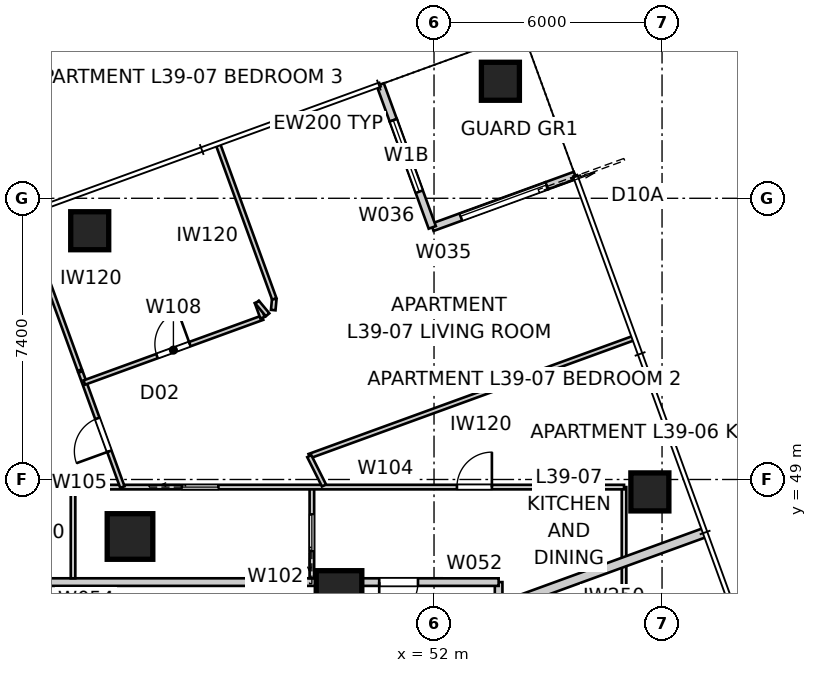
"""IFC4 building model, lengths in metres.
Left out: names, types, materials, properties, quantities, classifications, styles, units other than length and angle.
Written with IfcOpenShell. Run it as: python <this file> out.ifc"""

import sys

from ifc_helpers import new_model, si_unit, direction, frame, frame_2d, origin, origin_2d, place, context, subcontext, project, spatial, rectangle, extrude, element, fill, save


model = new_model("IFC4")
c1 = context("Model", 3, precision=1e-05, world=origin(), true_north=direction((0.0, 1.0)))
c2 = subcontext(c1, "Body", "Model", "MODEL_VIEW")
j1 = project(units=[si_unit("LENGTHUNIT", "METRE"), si_unit("PLANEANGLEUNIT", "RADIAN")], contexts=[c1])
p1 = place(None, origin())
s1 = spatial("IfcSite", under=j1, at=p1, CompositionType="ELEMENT")
p2 = place(p1, origin())
s2 = spatial("IfcBuilding", under=s1, at=p2, CompositionType="ELEMENT")
p3 = place(p2, frame((0.0, 0.0, 143.8)))
s3 = spatial("IfcBuildingStorey", under=s2, at=p3, CompositionType="ELEMENT", Elevation=143.8)
for number, where, z_axis, x_axis in (
    (1, (57.68, 48.673, -0.15), (0.0, 0.0, 1.0), (1.0, 0.0, 0.0)),
    (2, (53.747, 59.479, -0.15), (0.0, 0.0, 1.0), (1.0, 0.0, 0.0)),
    (3, (42.94, 55.546, -0.15), (0.0, 0.0, 1.0), (1.0, 0.0, 0.0)),
):
    element("IfcColumn", number, at=place(p3, frame(where, z_axis=z_axis, x_axis=x_axis)), inside=s3, PredefinedType="COLUMN", context=c2, shape_type="SweptSolid", body=[
        extrude(rectangle(XDim=1.0, YDim=1.0, at=origin_2d()), origin(), (0.0, 0.0, 1.0), 3.55),
    ])
for number, where, z_axis, x_axis in (
    (4, (49.5, 46.0, 0.0), (0.0, 0.0, 1.0), (1.0, 0.0, 0.0)),
    (5, (44.0, 47.5, 0.0), (0.0, 0.0, 1.0), (1.0, 0.0, 0.0)),
):
    element("IfcColumn", number, at=place(p3, frame(where, z_axis=z_axis, x_axis=x_axis)), inside=s3, PredefinedType="COLUMN", context=c2, shape_type="SweptSolid", body=[
        extrude(rectangle(XDim=1.2, YDim=1.2, at=origin_2d()), origin(), (0.0, 0.0, 1.0), 3.4),
    ])
p4 = place(p3, frame((55.712, 57.002, 0.0), z_axis=(0.0, 0.0, 1.0), x_axis=(-0.939659694648, -0.342110593602, 0.0)))
e6 = element("IfcWall", 6, at=p4, inside=s3, PredefinedType="SOLIDWALL", context=c2, shape_type="SweptSolid", body=[
    extrude(rectangle(XDim=0.8, YDim=0.2, at=frame_2d((0.4, 0.0))), origin(), (0.0, 0.0, 1.0), 3.25),
])
p5 = place(p3, frame((54.96, 56.729, 0.0), z_axis=(0.0, 0.0, 1.0), x_axis=(-0.939693144909, -0.342018703306, 0.0)))
e7 = element("IfcWall", 7, at=p5, inside=s3, PredefinedType="SOLIDWALL", context=c2, shape_type="SweptSolid", body=[
    extrude(rectangle(XDim=3.2, YDim=0.2, at=frame_2d((1.6, 0.0))), origin(), (0.0, 0.0, 1.0), 2.722),
])
p6 = place(p5, origin())
e8 = element("IfcOpeningElement", 8, at=p6, cuts=e7, PredefinedType="OPENING", context=c2, shape_type="SweptSolid", body=[
    extrude(rectangle(XDim=2.4, YDim=2.1, at=frame_2d((1.2, 1.05))), frame((0.0, 0.11, 0.0), z_axis=(0.0, -1.0, 0.0), x_axis=(1.0, 0.0, 0.0)), (0.0, 0.0, 1.0), 0.22),
])
p7 = place(p3, frame((51.953, 55.634, 0.0), z_axis=(0.0, 0.0, 1.0), x_axis=(-0.341965219194, 0.939712609717, 0.0)))
e9 = element("IfcWall", 9, at=p7, inside=s3, PredefinedType="SOLIDWALL", context=c2, shape_type="SweptSolid", body=[
    extrude(rectangle(XDim=3.0, YDim=0.2, at=frame_2d((1.5, 0.0))), origin(), (0.0, 0.0, 1.0), 2.722),
])
p8 = place(p7, frame((1.0, 0.0, 0.45)))
e10 = element("IfcOpeningElement", 10, at=p8, cuts=e9, PredefinedType="OPENING", context=c2, shape_type="SweptSolid", body=[
    extrude(rectangle(XDim=2.0, YDim=1.8, at=frame_2d((1.0, 0.9))), frame((0.0, 0.11, 0.0), z_axis=(0.0, -1.0, 0.0), x_axis=(1.0, 0.0, 0.0)), (0.0, 0.0, 1.0), 0.22),
])
p9 = place(p3, frame((50.927, 58.453, 0.0), z_axis=(0.0, 0.0, 1.0), x_axis=(-0.342037080957, 0.939686455819, 0.0)))
e11 = element("IfcWall", 11, at=p9, inside=s3, PredefinedType="SOLIDWALL", context=c2, shape_type="SweptSolid", body=[
    extrude(rectangle(XDim=1.0, YDim=0.2, at=frame_2d((0.5, 0.0))), origin(), (0.0, 0.0, 1.0), 3.25),
])
p10 = place(p3, frame((53.7, 13.3, 0.0), z_axis=(0.0, 0.0, 1.0), x_axis=(0.0, 1.0, 0.0)))
e12 = element("IfcWall", 12, at=p10, inside=s3, PredefinedType="PARTITIONING", context=c2, shape_type="SweptSolid", body=[
    extrude(rectangle(XDim=33.0, YDim=0.2, at=frame_2d((16.5, 0.0))), origin(), (0.0, 0.0, 1.0), 3.25),
])
p11 = place(p10, frame((28.411, 0.0, 0.0)))
e13 = element("IfcOpeningElement", 13, at=p11, cuts=e12, PredefinedType="OPENING", context=c2, shape_type="SweptSolid", body=[
    extrude(rectangle(XDim=1.02, YDim=2.1, at=frame_2d((0.51, 1.05))), frame((0.0, 0.11, 0.0), z_axis=(0.0, -1.0, 0.0), x_axis=(1.0, 0.0, 0.0)), (0.0, 0.0, 1.0), 0.22),
])
p12 = place(p10, frame((13.741, 0.0, 0.0)))
e14 = element("IfcOpeningElement", 14, at=p12, cuts=e12, PredefinedType="OPENING", context=c2, shape_type="SweptSolid", body=[
    extrude(rectangle(XDim=1.02, YDim=2.34, at=frame_2d((0.51, 1.17))), frame((0.0, 0.11, 0.0), z_axis=(0.0, -1.0, 0.0), x_axis=(1.0, 0.0, 0.0)), (0.0, 0.0, 1.0), 0.22),
])
p13 = place(p3, frame((53.7, 46.3, 0.0), z_axis=(0.0, 0.0, 1.0), x_axis=(-1.0, 0.0, 0.0)))
e15 = element("IfcWall", 15, at=p13, inside=s3, PredefinedType="PARTITIONING", context=c2, shape_type="SweptSolid", body=[
    extrude(rectangle(XDim=4.458, YDim=0.2, at=frame_2d((2.229, 0.0))), origin(), (0.0, 0.0, 1.0), 3.25),
])
p14 = place(p13, frame((2.122, 0.0, 0.0)))
e16 = element("IfcOpeningElement", 16, at=p14, cuts=e15, PredefinedType="OPENING", context=c2, shape_type="SweptSolid", body=[
    extrude(rectangle(XDim=1.02, YDim=2.34, at=frame_2d((0.51, 1.17))), frame((0.0, 0.11, 0.0), z_axis=(0.0, -1.0, 0.0), x_axis=(1.0, 0.0, 0.0)), (0.0, 0.0, 1.0), 0.22),
])
p15 = place(p3, frame((49.242, 46.3, 0.0), z_axis=(0.0, 0.0, 1.0), x_axis=(-1.0, 0.0, 0.0)))
e17 = element("IfcWall", 17, at=p15, inside=s3, PredefinedType="PARTITIONING", context=c2, shape_type="SweptSolid", body=[
    extrude(rectangle(XDim=1.683, YDim=0.2, at=frame_2d((0.842, 0.0))), origin(), (0.0, 0.0, 1.0), 2.55),
])
p16 = place(p3, frame((47.558, 46.3, 0.0), z_axis=(0.0, 0.0, 1.0), x_axis=(-1.0, 0.0, 0.0)))
e18 = element("IfcWall", 18, at=p16, inside=s3, PredefinedType="PARTITIONING", context=c2, shape_type="SweptSolid", body=[
    extrude(rectangle(XDim=15.117, YDim=0.2, at=frame_2d((7.558, 0.0))), origin(), (0.0, 0.0, 1.0), 3.25),
])
p17 = place(p16, frame((9.422, 0.0, 0.0)))
e19 = element("IfcOpeningElement", 19, at=p17, cuts=e18, PredefinedType="OPENING", context=c2, shape_type="SweptSolid", body=[
    extrude(rectangle(XDim=1.02, YDim=2.34, at=frame_2d((0.51, 1.17))), frame((0.0, 0.11, 0.0), z_axis=(0.0, -1.0, 0.0), x_axis=(1.0, 0.0, 0.0)), (0.0, 0.0, 1.0), 0.22),
])
p18 = place(p3, frame((59.132, 47.605, 0.0), z_axis=(0.0, 0.0, 1.0), x_axis=(-0.939690274876, -0.342026588591, 0.0)))
e20 = element("IfcWall", 20, at=p18, inside=s3, PredefinedType="PARTITIONING", context=c2, shape_type="SweptSolid", body=[
    extrude(rectangle(XDim=5.669, YDim=0.25, at=frame_2d((2.834, 0.0))), origin(), (0.0, 0.0, 1.0), 3.25),
])
p19 = place(p3, frame((57.0, 48.8, 0.0), z_axis=(0.0, 0.0, 1.0), x_axis=(0.0, -1.0, 0.0)))
e21 = element("IfcWall", 21, at=p19, inside=s3, PredefinedType="PARTITIONING", context=c2, shape_type="SweptSolid", body=[
    extrude(rectangle(XDim=38.113, YDim=0.12, at=frame_2d((19.056, 0.0))), origin(), (0.0, 0.0, 1.0), 2.55),
])
p20 = place(p19, frame((4.198, 0.0, 0.0)))
e22 = element("IfcOpeningElement", 22, at=p20, cuts=e21, PredefinedType="OPENING", context=c2, shape_type="SweptSolid", body=[
    extrude(rectangle(XDim=0.92, YDim=2.34, at=frame_2d((0.46, 1.17))), frame((0.0, 0.07, 0.0), z_axis=(0.0, -1.0, 0.0), x_axis=(1.0, 0.0, 0.0)), (0.0, 0.0, 1.0), 0.14),
])
p21 = place(p19, frame((7.692, 0.0, 0.0)))
e23 = element("IfcOpeningElement", 23, at=p21, cuts=e21, PredefinedType="OPENING", context=c2, shape_type="SweptSolid", body=[
    extrude(rectangle(XDim=0.92, YDim=2.34, at=frame_2d((0.46, 1.17))), frame((0.0, 0.07, 0.0), z_axis=(0.0, -1.0, 0.0), x_axis=(1.0, 0.0, 0.0)), (0.0, 0.0, 1.0), 0.14),
])
p22 = place(p19, frame((20.162, 0.0, 0.0)))
e24 = element("IfcOpeningElement", 24, at=p22, cuts=e21, PredefinedType="OPENING", context=c2, shape_type="SweptSolid", body=[
    extrude(rectangle(XDim=0.92, YDim=2.34, at=frame_2d((0.46, 1.17))), frame((0.0, 0.07, 0.0), z_axis=(0.0, -1.0, 0.0), x_axis=(1.0, 0.0, 0.0)), (0.0, 0.0, 1.0), 0.14),
])
p23 = place(p19, frame((34.056, 0.0, 0.0)))
e25 = element("IfcOpeningElement", 25, at=p23, cuts=e21, PredefinedType="OPENING", context=c2, shape_type="SweptSolid", body=[
    extrude(rectangle(XDim=0.92, YDim=2.34, at=frame_2d((0.46, 1.17))), frame((0.0, 0.07, 0.0), z_axis=(0.0, -1.0, 0.0), x_axis=(1.0, 0.0, 0.0)), (0.0, 0.0, 1.0), 0.14),
])
p24 = place(p19, frame((24.482, 0.0, 0.0)))
e26 = element("IfcOpeningElement", 26, at=p24, cuts=e21, PredefinedType="OPENING", context=c2, shape_type="SweptSolid", body=[
    extrude(rectangle(XDim=0.96, YDim=2.1, at=frame_2d((0.48, 1.05))), frame((0.0, 0.07, 0.0), z_axis=(0.0, -1.0, 0.0), x_axis=(1.0, 0.0, 0.0)), (0.0, 0.0, 1.0), 0.14),
])
p25 = place(p3, frame((48.786, 46.4, 0.0), z_axis=(0.0, 0.0, 1.0), x_axis=(0.0, 1.0, 0.0)))
e27 = element("IfcWall", 27, at=p25, inside=s3, PredefinedType="PARTITIONING", context=c2, shape_type="SweptSolid", body=[
    extrude(rectangle(XDim=2.4, YDim=0.12, at=frame_2d((1.2, 0.0))), origin(), (0.0, 0.0, 1.0), 3.25),
])
p26 = place(p25, frame((0.72, 0.0, 0.0)))
e28 = element("IfcOpeningElement", 28, at=p26, cuts=e27, PredefinedType="OPENING", context=c2, shape_type="SweptSolid", body=[
    extrude(rectangle(XDim=0.96, YDim=2.1, at=frame_2d((0.48, 1.05))), frame((0.0, 0.07, 0.0), z_axis=(0.0, -1.0, 0.0), x_axis=(1.0, 0.0, 0.0)), (0.0, 0.0, 1.0), 0.14),
])
p27 = place(p3, frame((42.501, 46.4, 0.0), z_axis=(0.0, 0.0, 1.0), x_axis=(0.0, 1.0, 0.0)))
e29 = element("IfcWall", 29, at=p27, inside=s3, PredefinedType="PARTITIONING", context=c2, shape_type="SweptSolid", body=[
    extrude(rectangle(XDim=2.4, YDim=0.12, at=frame_2d((1.2, 0.0))), origin(), (0.0, 0.0, 1.0), 3.25),
])
p28 = place(p3, frame((37.2, 48.8, 0.0), z_axis=(0.0, 0.0, 1.0), x_axis=(1.0, 0.0, 0.0)))
e30 = element("IfcWall", 30, at=p28, inside=s3, PredefinedType="PARTITIONING", context=c2, shape_type="SweptSolid", body=[
    extrude(rectangle(XDim=19.8, YDim=0.12, at=frame_2d((9.9, 0.0))), origin(), (0.0, 0.0, 1.0), 3.25),
])
p29 = place(p28, frame((15.403, 0.0, 0.0)))
e31 = element("IfcOpeningElement", 31, at=p29, cuts=e30, PredefinedType="OPENING", context=c2, shape_type="SweptSolid", body=[
    extrude(rectangle(XDim=0.92, YDim=2.34, at=frame_2d((0.46, 1.17))), frame((0.0, 0.07, 0.0), z_axis=(0.0, -1.0, 0.0), x_axis=(1.0, 0.0, 0.0)), (0.0, 0.0, 1.0), 0.14),
])
p30 = place(p28, frame((8.165, 0.0, 0.0)))
e32 = element("IfcOpeningElement", 32, at=p30, cuts=e30, PredefinedType="OPENING", context=c2, shape_type="SweptSolid", body=[
    extrude(rectangle(XDim=0.96, YDim=2.1, at=frame_2d((0.48, 1.05))), frame((0.0, 0.07, 0.0), z_axis=(0.0, -1.0, 0.0), x_axis=(1.0, 0.0, 0.0)), (0.0, 0.0, 1.0), 0.14),
])
p31 = place(p28, frame((2.81, 0.0, 0.0)))
e33 = element("IfcOpeningElement", 33, at=p31, cuts=e30, PredefinedType="OPENING", context=c2, shape_type="SweptSolid", body=[
    extrude(rectangle(XDim=0.96, YDim=2.1, at=frame_2d((0.48, 1.05))), frame((0.0, 0.07, 0.0), z_axis=(0.0, -1.0, 0.0), x_axis=(1.0, 0.0, 0.0)), (0.0, 0.0, 1.0), 0.14),
])
p32 = place(p3, frame((43.799, 48.8, 0.0), z_axis=(0.0, 0.0, 1.0), x_axis=(-0.342034943783, 0.939687233728, 0.0)))
e34 = element("IfcWall", 34, at=p32, inside=s3, PredefinedType="PARTITIONING", context=c2, shape_type="SweptSolid", body=[
    extrude(rectangle(XDim=3.223, YDim=0.12, at=frame_2d((1.612, 0.0))), origin(), (0.0, 0.0, 1.0), 3.25),
])
p33 = place(p32, frame((1.004, 0.0, 0.0)))
e35 = element("IfcOpeningElement", 35, at=p33, cuts=e34, PredefinedType="OPENING", context=c2, shape_type="SweptSolid", body=[
    extrude(rectangle(XDim=0.92, YDim=2.34, at=frame_2d((0.46, 1.17))), frame((0.0, 0.07, 0.0), z_axis=(0.0, -1.0, 0.0), x_axis=(1.0, 0.0, 0.0)), (0.0, 0.0, 1.0), 0.14),
])
p34 = place(p3, frame((57.231, 52.713, 0.0), z_axis=(0.0, 0.0, 1.0), x_axis=(-0.939692673089, -0.342019999623, 0.0)))
e36 = element("IfcWall", 36, at=p34, inside=s3, PredefinedType="PARTITIONING", context=c2, shape_type="SweptSolid", body=[
    extrude(rectangle(XDim=9.06, YDim=0.12, at=frame_2d((4.53, 0.0))), origin(), (0.0, 0.0, 1.0), 3.25),
])
p35 = place(p3, frame((48.717, 49.615, 0.0), z_axis=(0.0, 0.0, 1.0), x_axis=(0.448117513314, -0.893974660861, 0.0)))
e37 = element("IfcWall", 37, at=p35, inside=s3, PredefinedType="PARTITIONING", context=c2, shape_type="SweptSolid", body=[
    extrude(rectangle(XDim=0.864, YDim=0.12, at=frame_2d((0.432, 0.0))), origin(), (0.0, 0.0, 1.0), 3.25),
])
p36 = place(p3, frame((42.798, 51.551, 0.0), z_axis=(0.0, 0.0, 1.0), x_axis=(0.939699104319, 0.342002329438, 0.0)))
e38 = element("IfcWall", 38, at=p36, inside=s3, PredefinedType="PARTITIONING", context=c2, shape_type="SweptSolid", body=[
    extrude(rectangle(XDim=4.99, YDim=0.12, at=frame_2d((2.495, 0.0))), origin(), (0.0, 0.0, 1.0), 3.25),
])
p37 = place(p36, frame((2.035, 0.0, 0.0)))
e39 = element("IfcOpeningElement", 39, at=p37, cuts=e38, PredefinedType="OPENING", context=c2, shape_type="SweptSolid", body=[
    extrude(rectangle(XDim=0.92, YDim=2.34, at=frame_2d((0.46, 1.17))), frame((0.0, 0.07, 0.0), z_axis=(0.0, -1.0, 0.0), x_axis=(1.0, 0.0, 0.0)), (0.0, 0.0, 1.0), 0.14),
])
for number, where, z_axis, x_axis in (
    (40, (47.487, 53.258, 0.0), (0.0, 0.0, 1.0), (-0.342, 0.94, 0.0)),
    (41, (47.344, 53.667, 0.0), (0.0, 0.0, 1.0), (0.639, -0.77, 0.0)),
):
    element("IfcWall", number, at=place(p3, frame(where, z_axis=z_axis, x_axis=x_axis)), inside=s3, PredefinedType="PARTITIONING", context=c2, shape_type="SweptSolid", body=[
        extrude(rectangle(XDim=0.433, YDim=0.12, at=frame_2d((0.216, 0.0))), origin(), (0.0, 0.0, 1.0), 3.25),
    ])
p38 = place(p3, frame((47.769, 53.458, 0.0), z_axis=(0.0, 0.0, 1.0), x_axis=(0.093212941297, 0.995646195983, 0.0)))
e42 = element("IfcWall", 42, at=p38, inside=s3, PredefinedType="PARTITIONING", context=c2, shape_type="SweptSolid", body=[
    extrude(rectangle(XDim=0.296, YDim=0.12, at=frame_2d((0.148, 0.0))), origin(), (0.0, 0.0, 1.0), 3.25),
])
p39 = place(p3, frame((47.796, 53.752, 0.0), z_axis=(0.0, 0.0, 1.0), x_axis=(-0.342011603146, 0.939695729113, 0.0)))
e43 = element("IfcWall", 43, at=p39, inside=s3, PredefinedType="PARTITIONING", context=c2, shape_type="SweptSolid", body=[
    extrude(rectangle(XDim=4.307, YDim=0.12, at=frame_2d((2.153, 0.0))), origin(), (0.0, 0.0, 1.0), 3.25),
])
p40 = place(p3, frame((41.202, 55.935, 0.0), z_axis=(0.0, 0.0, 1.0), x_axis=(0.341992887332, -0.939702540709, 0.0)))
e44 = element("IfcWall", 44, at=p40, inside=s3, PredefinedType="PARTITIONING", context=c2, shape_type="SweptSolid", body=[
    extrude(rectangle(XDim=4.315, YDim=0.12, at=frame_2d((2.158, 0.0))), origin(), (0.0, 0.0, 1.0), 3.25),
])
p41 = place(p6, origin())
e45 = element("IfcDoor", 45, at=p41, inside=s3, OperationType="SLIDING_TO_LEFT", PredefinedType="DOOR", context=c2, shape_type="SweptSolid", body=[
    extrude(rectangle(XDim=2.4, YDim=2.1, at=frame_2d((1.2, 1.05))), frame((0.0, 0.025, 0.0), z_axis=(0.0, -1.0, 0.0), x_axis=(1.0, 0.0, 0.0)), (0.0, 0.0, 1.0), 0.05),
])
fill(e8, e45)
p42 = place(p8, origin())
e46 = element("IfcWindow", 46, at=p42, inside=s3, PartitioningType="SINGLE_PANEL", PredefinedType="WINDOW", context=c2, shape_type="SweptSolid", body=[
    extrude(rectangle(XDim=2.0, YDim=1.8, at=frame_2d((1.0, 0.9))), frame((0.0, 0.03, 0.0), z_axis=(0.0, -1.0, 0.0), x_axis=(1.0, 0.0, 0.0)), (0.0, 0.0, 1.0), 0.06),
])
fill(e10, e46)
p43 = place(p14, origin())
e47 = element("IfcDoor", 47, at=p43, inside=s3, OperationType="SINGLE_SWING_RIGHT", PredefinedType="DOOR", context=c2, shape_type="SweptSolid", body=[
    extrude(rectangle(XDim=1.02, YDim=2.34, at=frame_2d((0.51, 1.17))), frame((0.0, 0.025, 0.0), z_axis=(0.0, -1.0, 0.0), x_axis=(1.0, 0.0, 0.0)), (0.0, 0.0, 1.0), 0.05),
])
fill(e16, e47)
p44 = place(p29, origin())
e48 = element("IfcDoor", 48, at=p44, inside=s3, OperationType="SINGLE_SWING_RIGHT", PredefinedType="DOOR", context=c2, shape_type="SweptSolid", body=[
    extrude(rectangle(XDim=0.92, YDim=2.34, at=frame_2d((0.46, 1.17))), frame((0.0, 0.025, 0.0), z_axis=(0.0, -1.0, 0.0), x_axis=(1.0, 0.0, 0.0)), (0.0, 0.0, 1.0), 0.05),
])
fill(e31, e48)
p45 = place(p26, origin())
e49 = element("IfcDoor", 49, at=p45, inside=s3, OperationType="SLIDING_TO_LEFT", PredefinedType="DOOR", context=c2, shape_type="SweptSolid", body=[
    extrude(rectangle(XDim=0.96, YDim=2.1, at=frame_2d((0.48, 1.05))), frame((0.0, 0.025, 0.0), z_axis=(0.0, -1.0, 0.0), x_axis=(1.0, 0.0, 0.0)), (0.0, 0.0, 1.0), 0.05),
])
fill(e28, e49)
p46 = place(p30, origin())
e50 = element("IfcDoor", 50, at=p46, inside=s3, OperationType="SLIDING_TO_LEFT", PredefinedType="DOOR", context=c2, shape_type="SweptSolid", body=[
    extrude(rectangle(XDim=0.96, YDim=2.1, at=frame_2d((0.48, 1.05))), frame((0.0, 0.025, 0.0), z_axis=(0.0, -1.0, 0.0), x_axis=(1.0, 0.0, 0.0)), (0.0, 0.0, 1.0), 0.05),
])
fill(e32, e50)
p47 = place(p37, origin())
e51 = element("IfcDoor", 51, at=p47, inside=s3, OperationType="SINGLE_SWING_RIGHT", PredefinedType="DOOR", context=c2, shape_type="SweptSolid", body=[
    extrude(rectangle(XDim=0.92, YDim=2.34, at=frame_2d((0.46, 1.17))), frame((0.0, 0.025, 0.0), z_axis=(0.0, -1.0, 0.0), x_axis=(1.0, 0.0, 0.0)), (0.0, 0.0, 1.0), 0.05),
])
fill(e39, e51)
p48 = place(p33, origin())
e52 = element("IfcDoor", 52, at=p48, inside=s3, OperationType="SINGLE_SWING_LEFT", PredefinedType="DOOR", context=c2, shape_type="SweptSolid", body=[
    extrude(rectangle(XDim=0.92, YDim=2.34, at=frame_2d((0.46, 1.17))), frame((0.0, 0.025, 0.0), z_axis=(0.0, -1.0, 0.0), x_axis=(1.0, 0.0, 0.0)), (0.0, 0.0, 1.0), 0.05),
])
fill(e35, e52)
save(model, sys.argv[1])
